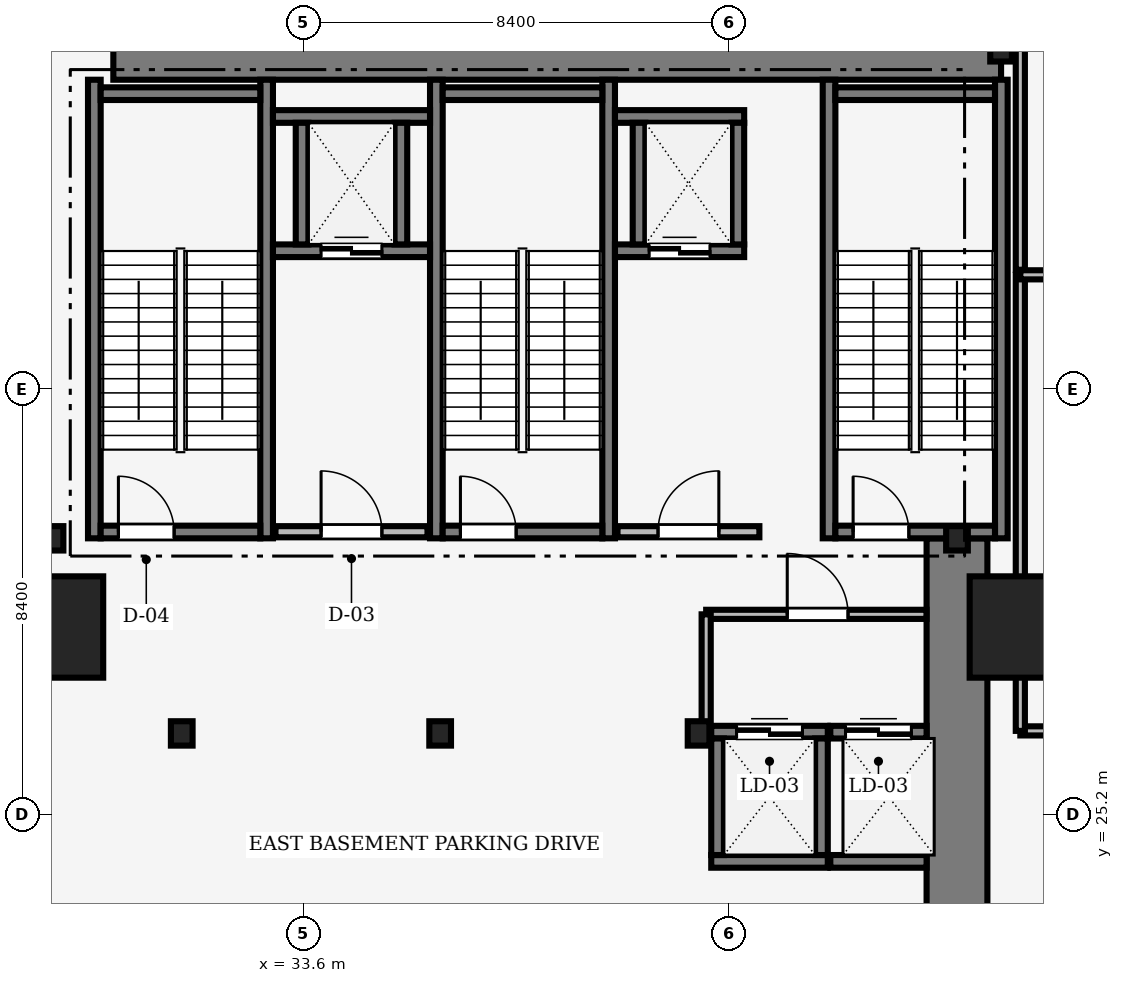
"""IFC4 building model, lengths in metres.
Left out: names, types, materials, properties, quantities, classifications, styles, units other than length and angle.
Written with IfcOpenShell. Run it as: python <this file> out.ifc"""

import sys

from ifc_helpers import new_model, si_unit, direction, frame, frame_2d, origin, origin_2d, place, context, subcontext, project, spatial, rectangle, i_section, extrude, source, transform, mapped, element, fill, save


model = new_model("IFC4")
c1 = context("Model", 3, precision=1e-05, world=origin(), true_north=direction((0.0, 1.0)))
c2 = subcontext(c1, "Body", "Model", "MODEL_VIEW")
j1 = project(units=[si_unit("LENGTHUNIT", "METRE"), si_unit("PLANEANGLEUNIT", "RADIAN")], contexts=[c1])
p1 = place(None, origin())
s1 = spatial("IfcSite", under=j1, at=p1, CompositionType="ELEMENT")
p2 = place(p1, origin())
s2 = spatial("IfcBuilding", under=s1, at=p2, CompositionType="ELEMENT")
p3 = place(p2, frame((0.0, 0.0, -11.4)))
s3 = spatial("IfcBuildingStorey", under=s2, at=p3, CompositionType="ELEMENT", Elevation=-11.4)
m1 = source(origin(), c2, "Body", "SweptSolid", [
    extrude(rectangle(XDim=17.52, YDim=1.2, at=frame_2d((8.76, 0.0))), origin(), (0.0, 0.0, 1.0), 5.04),
])
p4 = place(p3, frame((29.85, 40.3, 0.0), z_axis=(0.0, 0.0, 1.0), x_axis=(1.0, 0.0, 0.0)))
e1 = element("IfcWall", 1, at=p4, inside=s3, PredefinedType="SHEAR", context=c2, shape_type="MappedRepresentation", body=[
    mapped(m1, transform((0.0, 0.0, 0.0), scale=1.0)),
])
m2 = source(origin(), c2, "Body", "SweptSolid", [
    extrude(rectangle(XDim=13.15, YDim=1.2, at=frame_2d((6.575, 0.0))), origin(), (0.0, 0.0, 1.0), 5.04),
])
p5 = place(p3, frame((46.5, 17.5, 0.0), z_axis=(0.0, 0.0, 1.0), x_axis=(0.0, 1.0, 0.0)))
e2 = element("IfcWall", 2, at=p5, inside=s3, PredefinedType="SHEAR", context=c2, shape_type="MappedRepresentation", body=[
    mapped(m2, transform((0.0, 0.0, 0.0), scale=1.0)),
])
m3 = source(origin(), c2, "Body", "SweptSolid", [
    extrude(i_section(OverallWidth=0.428, OverallDepth=0.481, WebThickness=0.04, FlangeThickness=0.063, FilletRadius=0.015, at=origin_2d()), origin(), (0.0, 0.0, 1.0), 5.04),
])
for number, where, z_axis, x_axis in (
    (3, (41.4, 26.8, 0.0), (0.0, 0.0, 1.0), (1.0, 0.0, 0.0)),
    (4, (36.3, 26.8, 0.0), (0.0, 0.0, 1.0), (1.0, 0.0, 0.0)),
    (5, (31.2, 26.8, 0.0), (0.0, 0.0, 1.0), (1.0, 0.0, 0.0)),
    (6, (28.65, 30.65, 0.0), (0.0, 0.0, 1.0), (1.0, 0.0, 0.0)),
    (7, (46.5, 30.65, 0.0), (0.0, 0.0, 1.0), (1.0, 0.0, 0.0)),
    (8, (47.37, 40.3, 0.0), (0.0, 0.0, 1.0), (1.0, 0.0, 0.0)),
):
    element("IfcColumn", number, at=place(p3, frame(where, z_axis=z_axis, x_axis=x_axis)), inside=s3, PredefinedType="COLUMN", context=c2, shape_type="MappedRepresentation", body=[
        mapped(m3, transform((0.0, 0.0, 0.0), scale=1.0)),
    ])
m4 = source(origin(), c2, "Body", "SweptSolid", [
    extrude(rectangle(XDim=2.0, YDim=2.0, at=origin_2d()), origin(), (0.0, 0.0, 1.0), 5.04),
])
for number, where, z_axis, x_axis in (
    (9, (28.65, 28.9, 0.0), (0.0, 0.0, 1.0), (1.0, 0.0, 0.0)),
    (10, (47.75, 28.9, 0.0), (0.0, 0.0, 1.0), (1.0, 0.0, 0.0)),
):
    element("IfcColumn", number, at=place(p3, frame(where, z_axis=z_axis, x_axis=x_axis)), inside=s3, PredefinedType="COLUMN", context=c2, shape_type="MappedRepresentation", body=[
        mapped(m4, transform((0.0, 0.0, 0.0), scale=1.0)),
    ])
m5 = source(origin(), c2, "Body", "SweptSolid", [
    extrude(rectangle(XDim=9.05, YDim=0.25, at=frame_2d((4.525, 0.0))), origin(), (0.0, 0.0, 1.0), 5.2),
])
for number, where, z_axis, x_axis in (
    (11, (29.475, 30.65, 0.0), (0.0, 0.0, 1.0), (0.0, 1.0, 0.0)),
    (12, (32.875, 30.65, 0.0), (0.0, 0.0, 1.0), (0.0, 1.0, 0.0)),
):
    element("IfcWall", number, at=place(p3, frame(where, z_axis=z_axis, x_axis=x_axis)), inside=s3, PredefinedType="SOLIDWALL", context=c2, shape_type="MappedRepresentation", body=[
        mapped(m5, transform((0.0, 0.0, 0.0), scale=1.0)),
    ])
m6 = source(origin(), c2, "Body", "SweptSolid", [
    extrude(rectangle(XDim=3.15, YDim=0.25, at=frame_2d((1.575, 0.0))), origin(), (0.0, 0.0, 1.0), 5.2),
])
p6 = place(p3, frame((29.6, 39.425, 0.0), z_axis=(0.0, 0.0, 1.0), x_axis=(1.0, 0.0, 0.0)))
e13 = element("IfcWall", 13, at=p6, inside=s3, PredefinedType="SOLIDWALL", context=c2, shape_type="MappedRepresentation", body=[
    mapped(m6, transform((0.0, 0.0, 0.0), scale=1.0)),
])
p7 = place(p3, frame((29.6, 30.775, 0.0), z_axis=(0.0, 0.0, 1.0), x_axis=(1.0, 0.0, 0.0)))
e14 = element("IfcWall", 14, at=p7, inside=s3, PredefinedType="SOLIDWALL", context=c2, shape_type="MappedRepresentation", body=[
    mapped(m6, transform((0.0, 0.0, 0.0), scale=1.0)),
])
m7 = source(origin(), c2, "Body", "SweptSolid", [
    extrude(rectangle(XDim=1.1, YDim=2.2, at=frame_2d((0.55, 1.1))), frame((0.0, 0.135, 0.0), z_axis=(0.0, -1.0, 0.0), x_axis=(1.0, 0.0, 0.0)), (0.0, 0.0, 1.0), 0.27),
])
p8 = place(p7, frame((0.35, 0.0, 0.0)))
e15 = element("IfcOpeningElement", 15, at=p8, cuts=e14, PredefinedType="OPENING", context=c2, shape_type="MappedRepresentation", body=[
    mapped(m7, transform((0.0, 0.0, 0.0), scale=1.0)),
])
for number, where, z_axis, x_axis in (
    (16, (36.225, 30.65, 0.0), (0.0, 0.0, 1.0), (0.0, 1.0, 0.0)),
    (17, (39.625, 30.65, 0.0), (0.0, 0.0, 1.0), (0.0, 1.0, 0.0)),
):
    element("IfcWall", number, at=place(p3, frame(where, z_axis=z_axis, x_axis=x_axis)), inside=s3, PredefinedType="SOLIDWALL", context=c2, shape_type="MappedRepresentation", body=[
        mapped(m5, transform((0.0, 0.0, 0.0), scale=1.0)),
    ])
p9 = place(p3, frame((36.35, 39.425, 0.0), z_axis=(0.0, 0.0, 1.0), x_axis=(1.0, 0.0, 0.0)))
e18 = element("IfcWall", 18, at=p9, inside=s3, PredefinedType="SOLIDWALL", context=c2, shape_type="MappedRepresentation", body=[
    mapped(m6, transform((0.0, 0.0, 0.0), scale=1.0)),
])
p10 = place(p3, frame((36.35, 30.775, 0.0), z_axis=(0.0, 0.0, 1.0), x_axis=(1.0, 0.0, 0.0)))
e19 = element("IfcWall", 19, at=p10, inside=s3, PredefinedType="SOLIDWALL", context=c2, shape_type="MappedRepresentation", body=[
    mapped(m6, transform((0.0, 0.0, 0.0), scale=1.0)),
])
p11 = place(p10, frame((0.35, 0.0, 0.0)))
e20 = element("IfcOpeningElement", 20, at=p11, cuts=e19, PredefinedType="OPENING", context=c2, shape_type="MappedRepresentation", body=[
    mapped(m7, transform((0.0, 0.0, 0.0), scale=1.0)),
])
for number, where, z_axis, x_axis in (
    (21, (43.975, 30.65, 0.0), (0.0, 0.0, 1.0), (0.0, 1.0, 0.0)),
    (22, (47.375, 30.65, 0.0), (0.0, 0.0, 1.0), (0.0, 1.0, 0.0)),
):
    element("IfcWall", number, at=place(p3, frame(where, z_axis=z_axis, x_axis=x_axis)), inside=s3, PredefinedType="SOLIDWALL", context=c2, shape_type="MappedRepresentation", body=[
        mapped(m5, transform((0.0, 0.0, 0.0), scale=1.0)),
    ])
p12 = place(p3, frame((44.1, 39.425, 0.0), z_axis=(0.0, 0.0, 1.0), x_axis=(1.0, 0.0, 0.0)))
e23 = element("IfcWall", 23, at=p12, inside=s3, PredefinedType="SOLIDWALL", context=c2, shape_type="MappedRepresentation", body=[
    mapped(m6, transform((0.0, 0.0, 0.0), scale=1.0)),
])
p13 = place(p3, frame((44.1, 30.775, 0.0), z_axis=(0.0, 0.0, 1.0), x_axis=(1.0, 0.0, 0.0)))
e24 = element("IfcWall", 24, at=p13, inside=s3, PredefinedType="SOLIDWALL", context=c2, shape_type="MappedRepresentation", body=[
    mapped(m6, transform((0.0, 0.0, 0.0), scale=1.0)),
])
p14 = place(p13, frame((0.35, 0.0, 0.0)))
e25 = element("IfcOpeningElement", 25, at=p14, cuts=e24, PredefinedType="OPENING", context=c2, shape_type="MappedRepresentation", body=[
    mapped(m7, transform((0.0, 0.0, 0.0), scale=1.0)),
])
m8 = source(origin(), c2, "Body", "SweptSolid", [
    extrude(rectangle(XDim=3.0, YDim=0.22, at=frame_2d((1.5, 0.0))), origin(), (0.0, 0.0, 1.0), 5.04),
])
p15 = place(p3, frame((33.05, 30.78, 0.0), z_axis=(0.0, 0.0, 1.0), x_axis=(1.0, 0.0, 0.0)))
e26 = element("IfcWall", 26, at=p15, inside=s3, PredefinedType="SOLIDWALL", context=c2, shape_type="MappedRepresentation", body=[
    mapped(m8, transform((0.0, 0.0, 0.0), scale=1.0)),
])
m9 = source(origin(), c2, "Body", "SweptSolid", [
    extrude(rectangle(XDim=1.2, YDim=2.2, at=frame_2d((0.6, 1.1))), frame((0.0, 0.12, 0.0), z_axis=(0.0, -1.0, 0.0), x_axis=(1.0, 0.0, 0.0)), (0.0, 0.0, 1.0), 0.24),
])
p16 = place(p15, frame((0.9, 0.0, 0.0)))
e27 = element("IfcOpeningElement", 27, at=p16, cuts=e26, PredefinedType="OPENING", context=c2, shape_type="MappedRepresentation", body=[
    mapped(m9, transform((0.0, 0.0, 0.0), scale=1.0)),
])
m10 = source(origin(), c2, "Body", "SweptSolid", [
    extrude(rectangle(XDim=2.8, YDim=0.22, at=frame_2d((1.4, 0.0))), origin(), (0.0, 0.0, 1.0), 5.04),
])
p17 = place(p3, frame((39.8, 30.78, 0.0), z_axis=(0.0, 0.0, 1.0), x_axis=(1.0, 0.0, 0.0)))
e28 = element("IfcWall", 28, at=p17, inside=s3, PredefinedType="SOLIDWALL", context=c2, shape_type="MappedRepresentation", body=[
    mapped(m10, transform((0.0, 0.0, 0.0), scale=1.0)),
])
p18 = place(p17, frame((0.8, 0.0, 0.0)))
e29 = element("IfcOpeningElement", 29, at=p18, cuts=e28, PredefinedType="OPENING", context=c2, shape_type="MappedRepresentation", body=[
    mapped(m9, transform((0.0, 0.0, 0.0), scale=1.0)),
])
m11 = source(origin(), c2, "Body", "SweptSolid", [
    extrude(rectangle(XDim=3.1, YDim=0.25, at=frame_2d((1.55, 0.0))), origin(), (0.0, 0.0, 1.0), 5.04),
])
p19 = place(p3, frame((33.0, 36.325, 0.0), z_axis=(0.0, 0.0, 1.0), x_axis=(1.0, 0.0, 0.0)))
e30 = element("IfcWall", 30, at=p19, inside=s3, PredefinedType="SOLIDWALL", context=c2, shape_type="MappedRepresentation", body=[
    mapped(m11, transform((0.0, 0.0, 0.0), scale=1.0)),
])
m12 = source(origin(), c2, "Body", "SweptSolid", [
    extrude(rectangle(XDim=1.2, YDim=2.25, at=frame_2d((0.6, 1.125))), frame((0.0, 0.135, 0.0), z_axis=(0.0, -1.0, 0.0), x_axis=(1.0, 0.0, 0.0)), (0.0, 0.0, 1.0), 0.27),
])
p20 = place(p19, frame((0.95, 0.0, 0.0)))
e31 = element("IfcOpeningElement", 31, at=p20, cuts=e30, PredefinedType="OPENING", context=c2, shape_type="MappedRepresentation", body=[
    mapped(m12, transform((0.0, 0.0, 0.0), scale=1.0)),
])
p21 = place(p3, frame((33.0, 38.975, 0.0), z_axis=(0.0, 0.0, 1.0), x_axis=(1.0, 0.0, 0.0)))
e32 = element("IfcWall", 32, at=p21, inside=s3, PredefinedType="SOLIDWALL", context=c2, shape_type="MappedRepresentation", body=[
    mapped(m11, transform((0.0, 0.0, 0.0), scale=1.0)),
])
m13 = source(origin(), c2, "Body", "SweptSolid", [
    extrude(rectangle(XDim=2.4, YDim=0.25, at=frame_2d((1.2, 0.0))), origin(), (0.0, 0.0, 1.0), 5.04),
])
for number, where, z_axis, x_axis in (
    (33, (33.575, 36.45, 0.0), (0.0, 0.0, 1.0), (0.0, 1.0, 0.0)),
    (34, (35.525, 36.45, 0.0), (0.0, 0.0, 1.0), (0.0, 1.0, 0.0)),
):
    element("IfcWall", number, at=place(p3, frame(where, z_axis=z_axis, x_axis=x_axis)), inside=s3, PredefinedType="SOLIDWALL", context=c2, shape_type="MappedRepresentation", body=[
        mapped(m13, transform((0.0, 0.0, 0.0), scale=1.0)),
    ])
m14 = source(origin(), c2, "Body", "SweptSolid", [
    extrude(rectangle(XDim=2.55, YDim=0.25, at=frame_2d((1.275, 0.0))), origin(), (0.0, 0.0, 1.0), 5.04),
])
p22 = place(p3, frame((39.75, 36.325, 0.0), z_axis=(0.0, 0.0, 1.0), x_axis=(1.0, 0.0, 0.0)))
e35 = element("IfcWall", 35, at=p22, inside=s3, PredefinedType="SOLIDWALL", context=c2, shape_type="MappedRepresentation", body=[
    mapped(m14, transform((0.0, 0.0, 0.0), scale=1.0)),
])
p23 = place(p22, frame((0.675, 0.0, 0.0)))
e36 = element("IfcOpeningElement", 36, at=p23, cuts=e35, PredefinedType="OPENING", context=c2, shape_type="MappedRepresentation", body=[
    mapped(m12, transform((0.0, 0.0, 0.0), scale=1.0)),
])
p24 = place(p3, frame((39.75, 38.975, 0.0), z_axis=(0.0, 0.0, 1.0), x_axis=(1.0, 0.0, 0.0)))
e37 = element("IfcWall", 37, at=p24, inside=s3, PredefinedType="SOLIDWALL", context=c2, shape_type="MappedRepresentation", body=[
    mapped(m14, transform((0.0, 0.0, 0.0), scale=1.0)),
])
for number, where, z_axis, x_axis in (
    (38, (40.225, 36.45, 0.0), (0.0, 0.0, 1.0), (0.0, 1.0, 0.0)),
    (39, (42.175, 36.45, 0.0), (0.0, 0.0, 1.0), (0.0, 1.0, 0.0)),
):
    element("IfcWall", number, at=place(p3, frame(where, z_axis=z_axis, x_axis=x_axis)), inside=s3, PredefinedType="SOLIDWALL", context=c2, shape_type="MappedRepresentation", body=[
        mapped(m13, transform((0.0, 0.0, 0.0), scale=1.0)),
    ])
m15 = source(origin(), c2, "Body", "SweptSolid", [
    extrude(rectangle(XDim=2.3, YDim=0.25, at=frame_2d((1.15, 0.0))), origin(), (0.0, 0.0, 1.0), 5.04),
])
p25 = place(p3, frame((41.65, 24.275, 0.0), z_axis=(0.0, 0.0, 1.0), x_axis=(1.0, 0.0, 0.0)))
e40 = element("IfcWall", 40, at=p25, inside=s3, PredefinedType="SOLIDWALL", context=c2, shape_type="MappedRepresentation", body=[
    mapped(m15, transform((0.0, 0.0, 0.0), scale=1.0)),
])
p26 = place(p3, frame((41.65, 26.825, 0.0), z_axis=(0.0, 0.0, 1.0), x_axis=(1.0, 0.0, 0.0)))
e41 = element("IfcWall", 41, at=p26, inside=s3, PredefinedType="SOLIDWALL", context=c2, shape_type="MappedRepresentation", body=[
    mapped(m15, transform((0.0, 0.0, 0.0), scale=1.0)),
])
m16 = source(origin(), c2, "Body", "SweptSolid", [
    extrude(rectangle(XDim=1.3, YDim=2.3, at=frame_2d((0.65, 1.15))), frame((0.0, 0.135, 0.0), z_axis=(0.0, -1.0, 0.0), x_axis=(1.0, 0.0, 0.0)), (0.0, 0.0, 1.0), 0.27),
])
p27 = place(p26, frame((0.5, 0.0, 0.0)))
e42 = element("IfcOpeningElement", 42, at=p27, cuts=e41, PredefinedType="OPENING", context=c2, shape_type="MappedRepresentation", body=[
    mapped(m16, transform((0.0, 0.0, 0.0), scale=1.0)),
])
for number, where, z_axis, x_axis in (
    (43, (41.775, 24.4, 0.0), (0.0, 0.0, 1.0), (0.0, 1.0, 0.0)),
    (44, (43.825, 24.4, 0.0), (0.0, 0.0, 1.0), (0.0, 1.0, 0.0)),
):
    element("IfcWall", number, at=place(p3, frame(where, z_axis=z_axis, x_axis=x_axis)), inside=s3, PredefinedType="SOLIDWALL", context=c2, shape_type="MappedRepresentation", body=[
        mapped(m15, transform((0.0, 0.0, 0.0), scale=1.0)),
    ])
m17 = source(origin(), c2, "Body", "SweptSolid", [
    extrude(rectangle(XDim=1.9, YDim=0.25, at=frame_2d((0.95, 0.0))), origin(), (0.0, 0.0, 1.0), 5.04),
])
p28 = place(p3, frame((44.0, 24.275, 0.0), z_axis=(0.0, 0.0, 1.0), x_axis=(1.0, 0.0, 0.0)))
e45 = element("IfcWall", 45, at=p28, inside=s3, PredefinedType="SOLIDWALL", context=c2, shape_type="MappedRepresentation", body=[
    mapped(m17, transform((0.0, 0.0, 0.0), scale=1.0)),
])
p29 = place(p3, frame((44.0, 26.825, 0.0), z_axis=(0.0, 0.0, 1.0), x_axis=(1.0, 0.0, 0.0)))
e46 = element("IfcWall", 46, at=p29, inside=s3, PredefinedType="SOLIDWALL", context=c2, shape_type="MappedRepresentation", body=[
    mapped(m17, transform((0.0, 0.0, 0.0), scale=1.0)),
])
p30 = place(p29, frame((0.3, 0.0, 0.0)))
e47 = element("IfcOpeningElement", 47, at=p30, cuts=e46, PredefinedType="OPENING", context=c2, shape_type="MappedRepresentation", body=[
    mapped(m16, transform((0.0, 0.0, 0.0), scale=1.0)),
])
m18 = source(origin(), c2, "Body", "SweptSolid", [
    extrude(rectangle(XDim=4.348, YDim=0.18, at=frame_2d((2.174, 0.0))), origin(), (0.0, 0.0, 1.0), 5.04),
])
p31 = place(p3, frame((41.55, 29.15, 0.0), z_axis=(0.0, 0.0, 1.0), x_axis=(1.0, 0.0, 0.0)))
e48 = element("IfcWall", 48, at=p31, inside=s3, PredefinedType="PARTITIONING", context=c2, shape_type="MappedRepresentation", body=[
    mapped(m18, transform((0.0, 0.0, 0.0), scale=1.0)),
])
m19 = source(origin(), c2, "Body", "SweptSolid", [
    extrude(rectangle(XDim=1.2, YDim=2.2, at=frame_2d((0.6, 1.1))), frame((0.0, 0.1, 0.0), z_axis=(0.0, -1.0, 0.0), x_axis=(1.0, 0.0, 0.0)), (0.0, 0.0, 1.0), 0.2),
])
p32 = place(p31, frame((1.6, 0.0, 0.0)))
e49 = element("IfcOpeningElement", 49, at=p32, cuts=e48, PredefinedType="OPENING", context=c2, shape_type="MappedRepresentation", body=[
    mapped(m19, transform((0.0, 0.0, 0.0), scale=1.0)),
])
m20 = source(origin(), c2, "Body", "SweptSolid", [
    extrude(rectangle(XDim=4.1, YDim=0.18, at=frame_2d((2.05, 0.0))), origin(), (0.0, 0.0, 1.0), 4.432),
])
p33 = place(p3, frame((47.75, 26.85, 0.0), z_axis=(0.0, 0.0, 1.0), x_axis=(1.0, 0.0, 0.0)))
e50 = element("IfcWall", 50, at=p33, inside=s3, PredefinedType="PARTITIONING", context=c2, shape_type="MappedRepresentation", body=[
    mapped(m20, transform((0.0, 0.0, 0.0), scale=1.0)),
])
m21 = source(origin(), c2, "Body", "SweptSolid", [
    extrude(rectangle(XDim=1.5, YDim=2.3, at=frame_2d((0.75, 1.15))), frame((0.0, 0.1, 0.0), z_axis=(0.0, -1.0, 0.0), x_axis=(1.0, 0.0, 0.0)), (0.0, 0.0, 1.0), 0.2),
])
p34 = place(p33, frame((1.42, 0.0, 0.0)))
e51 = element("IfcOpeningElement", 51, at=p34, cuts=e50, PredefinedType="OPENING", context=c2, shape_type="MappedRepresentation", body=[
    mapped(m21, transform((0.0, 0.0, 0.0), scale=1.0)),
])
m22 = source(origin(), c2, "Body", "SweptSolid", [
    extrude(rectangle(XDim=9.0, YDim=0.18, at=frame_2d((4.5, 0.0))), origin(), (0.0, 0.0, 1.0), 4.432),
])
p35 = place(p3, frame((47.75, 26.85, 0.0), z_axis=(0.0, 0.0, 1.0), x_axis=(0.0, 1.0, 0.0)))
e52 = element("IfcWall", 52, at=p35, inside=s3, PredefinedType="PARTITIONING", context=c2, shape_type="MappedRepresentation", body=[
    mapped(m22, transform((0.0, 0.0, 0.0), scale=1.0)),
])
m23 = source(origin(), c2, "Body", "SweptSolid", [
    extrude(rectangle(XDim=4.7, YDim=0.18, at=frame_2d((2.35, 0.0))), origin(), (0.0, 0.0, 1.0), 4.432),
])
p36 = place(p3, frame((47.75, 35.95, 0.0), z_axis=(0.0, 0.0, 1.0), x_axis=(0.0, 1.0, 0.0)))
e53 = element("IfcWall", 53, at=p36, inside=s3, PredefinedType="PARTITIONING", context=c2, shape_type="MappedRepresentation", body=[
    mapped(m23, transform((0.0, 0.0, 0.0), scale=1.0)),
])
p37 = place(p3, frame((47.75, 35.85, 0.0), z_axis=(0.0, 0.0, 1.0), x_axis=(1.0, 0.0, 0.0)))
e54 = element("IfcWall", 54, at=p37, inside=s3, PredefinedType="PARTITIONING", context=c2, shape_type="MappedRepresentation", body=[
    mapped(m20, transform((0.0, 0.0, 0.0), scale=1.0)),
])
m24 = source(origin(), c2, "Body", "SweptSolid", [
    extrude(rectangle(XDim=2.35, YDim=0.18, at=frame_2d((1.175, 0.0))), origin(), (0.0, 0.0, 1.0), 5.04),
])
p38 = place(p3, frame((41.55, 26.8, 0.0), z_axis=(0.0, 0.0, 1.0), x_axis=(0.0, 1.0, 0.0)))
e55 = element("IfcWall", 55, at=p38, inside=s3, PredefinedType="PARTITIONING", context=c2, shape_type="MappedRepresentation", body=[
    mapped(m24, transform((0.0, 0.0, 0.0), scale=1.0)),
])
m25 = source(origin(), c2, "Body", "SweptSolid", [
    extrude(rectangle(XDim=1.1, YDim=2.2, at=frame_2d((0.55, 1.1))), frame((0.0, 0.025, 0.0), z_axis=(0.0, -1.0, 0.0), x_axis=(1.0, 0.0, 0.0)), (0.0, 0.0, 1.0), 0.05),
])
p39 = place(p8, origin())
e56 = element("IfcDoor", 56, at=p39, inside=s3, OperationType="SINGLE_SWING_LEFT", PredefinedType="DOOR", context=c2, shape_type="MappedRepresentation", body=[
    mapped(m25, transform((0.0, 0.0, 0.0), scale=1.0)),
])
fill(e15, e56)
p40 = place(p11, origin())
e57 = element("IfcDoor", 57, at=p40, inside=s3, OperationType="SINGLE_SWING_LEFT", PredefinedType="DOOR", context=c2, shape_type="MappedRepresentation", body=[
    mapped(m25, transform((0.0, 0.0, 0.0), scale=1.0)),
])
fill(e20, e57)
p41 = place(p14, origin())
e58 = element("IfcDoor", 58, at=p41, inside=s3, OperationType="SINGLE_SWING_LEFT", PredefinedType="DOOR", context=c2, shape_type="MappedRepresentation", body=[
    mapped(m25, transform((0.0, 0.0, 0.0), scale=1.0)),
])
fill(e25, e58)
m26 = source(origin(), c2, "Body", "SweptSolid", [
    extrude(rectangle(XDim=1.2, YDim=2.2, at=frame_2d((0.6, 1.1))), frame((0.0, 0.025, 0.0), z_axis=(0.0, -1.0, 0.0), x_axis=(1.0, 0.0, 0.0)), (0.0, 0.0, 1.0), 0.05),
])
p42 = place(p16, origin())
e59 = element("IfcDoor", 59, at=p42, inside=s3, OperationType="SINGLE_SWING_LEFT", PredefinedType="DOOR", context=c2, shape_type="MappedRepresentation", body=[
    mapped(m26, transform((0.0, 0.0, 0.0), scale=1.0)),
])
fill(e27, e59)
p43 = place(p18, origin())
e60 = element("IfcDoor", 60, at=p43, inside=s3, OperationType="SINGLE_SWING_RIGHT", PredefinedType="DOOR", context=c2, shape_type="MappedRepresentation", body=[
    mapped(m26, transform((0.0, 0.0, 0.0), scale=1.0)),
])
fill(e29, e60)
m27 = source(origin(), c2, "Body", "SweptSolid", [
    extrude(rectangle(XDim=1.2, YDim=2.25, at=frame_2d((0.6, 1.125))), frame((0.0, 0.025, 0.0), z_axis=(0.0, -1.0, 0.0), x_axis=(1.0, 0.0, 0.0)), (0.0, 0.0, 1.0), 0.05),
])
p44 = place(p20, origin())
e61 = element("IfcDoor", 61, at=p44, inside=s3, OperationType="DOUBLE_DOOR_SLIDING", PredefinedType="DOOR", context=c2, shape_type="MappedRepresentation", body=[
    mapped(m27, transform((0.0, 0.0, 0.0), scale=1.0)),
])
fill(e31, e61)
p45 = place(p23, origin())
e62 = element("IfcDoor", 62, at=p45, inside=s3, OperationType="DOUBLE_DOOR_SLIDING", PredefinedType="DOOR", context=c2, shape_type="MappedRepresentation", body=[
    mapped(m27, transform((0.0, 0.0, 0.0), scale=1.0)),
])
fill(e36, e62)
m28 = source(origin(), c2, "Body", "SweptSolid", [
    extrude(rectangle(XDim=1.3, YDim=2.3, at=frame_2d((0.65, 1.15))), frame((0.0, 0.025, 0.0), z_axis=(0.0, -1.0, 0.0), x_axis=(1.0, 0.0, 0.0)), (0.0, 0.0, 1.0), 0.05),
])
p46 = place(p27, origin())
e63 = element("IfcDoor", 63, at=p46, inside=s3, OperationType="DOUBLE_DOOR_SLIDING", PredefinedType="DOOR", context=c2, shape_type="MappedRepresentation", body=[
    mapped(m28, transform((0.0, 0.0, 0.0), scale=1.0)),
])
fill(e42, e63)
p47 = place(p30, origin())
e64 = element("IfcDoor", 64, at=p47, inside=s3, OperationType="DOUBLE_DOOR_SLIDING", PredefinedType="DOOR", context=c2, shape_type="MappedRepresentation", body=[
    mapped(m28, transform((0.0, 0.0, 0.0), scale=1.0)),
])
fill(e47, e64)
p48 = place(p32, origin())
e65 = element("IfcDoor", 65, at=p48, inside=s3, OperationType="SINGLE_SWING_LEFT", PredefinedType="DOOR", context=c2, shape_type="MappedRepresentation", body=[
    mapped(m26, transform((0.0, 0.0, 0.0), scale=1.0)),
])
fill(e49, e65)
save(model, sys.argv[1])
